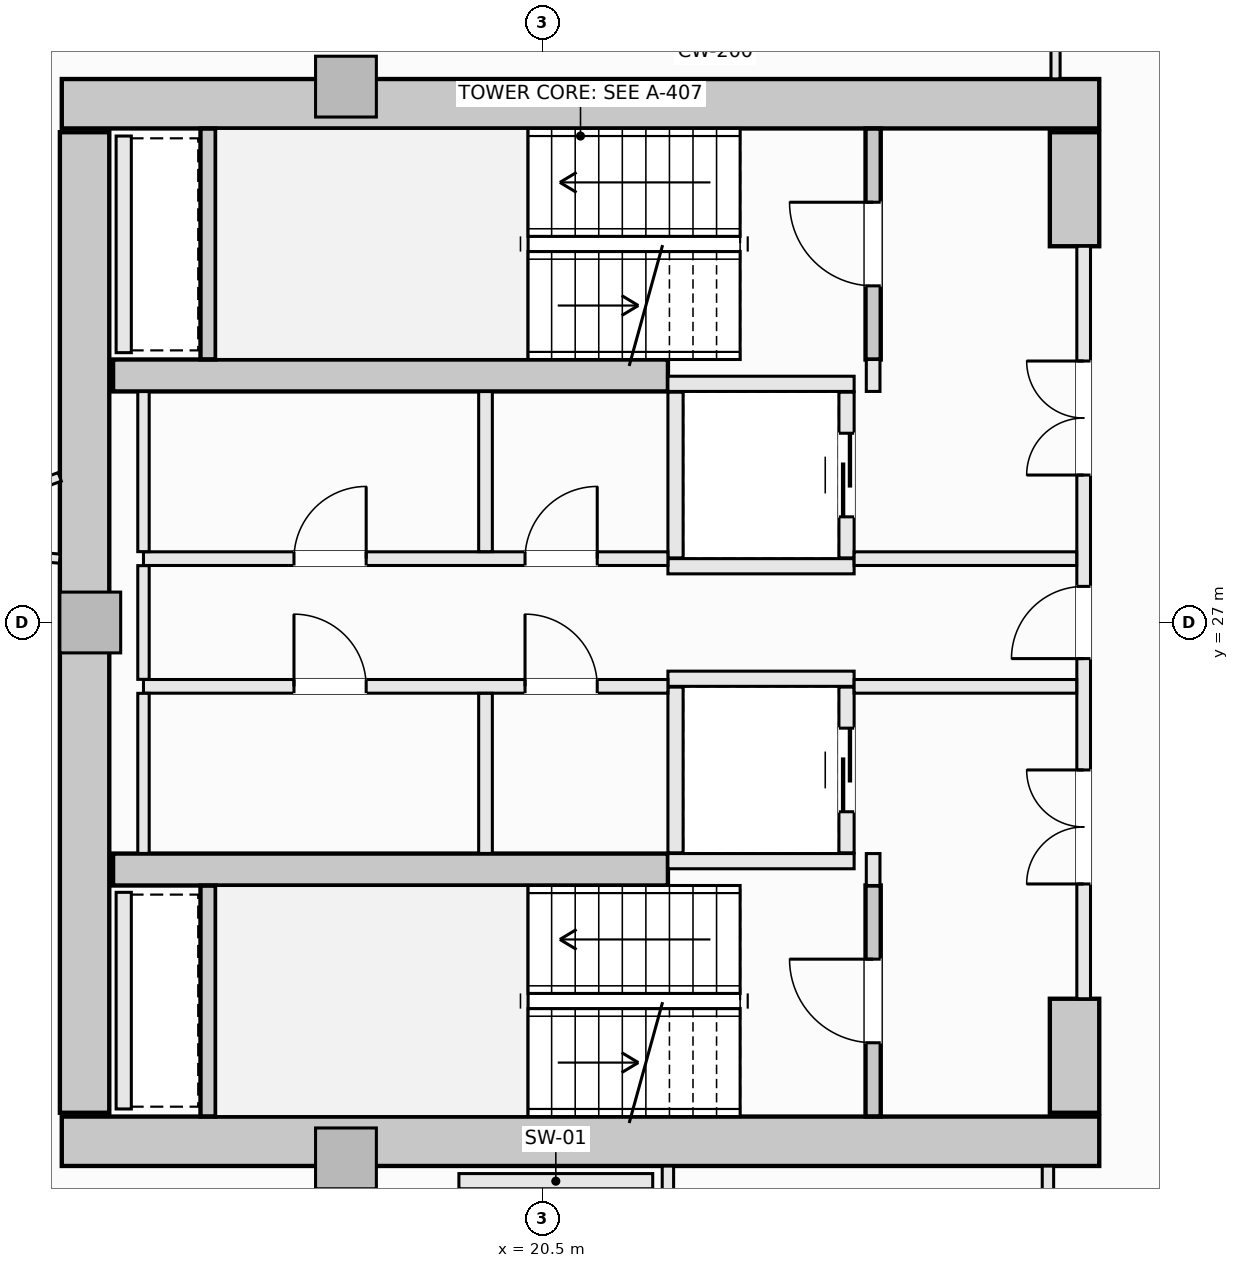
"""IFC4 building model, lengths in metres.
Left out: names, types, materials, properties, quantities, classifications, styles, units other than length and angle.
Written with IfcOpenShell. Run it as: python <this file> out.ifc"""

import sys

from ifc_helpers import new_model, si_unit, direction, frame, frame_2d, origin, origin_2d, place, context, subcontext, project, spatial, rectangle, extrude, element, fill, save


model = new_model("IFC4")
c1 = context("Model", 3, precision=1e-05, world=origin(), true_north=direction((0.0, 1.0)))
c2 = subcontext(c1, "Body", "Model", "MODEL_VIEW")
j1 = project(units=[si_unit("LENGTHUNIT", "METRE"), si_unit("PLANEANGLEUNIT", "RADIAN")], contexts=[c1])
p1 = place(None, origin())
s1 = spatial("IfcSite", under=j1, at=p1, CompositionType="ELEMENT")
p2 = place(p1, origin())
s2 = spatial("IfcBuilding", under=s1, at=p2, CompositionType="ELEMENT")
p3 = place(p2, frame((0.0, 0.0, 129.1)))
s3 = spatial("IfcBuildingStorey", under=s2, at=p3, CompositionType="ELEMENT", Elevation=129.1)
for number, where, z_axis, x_axis in (
    (1, (14.175, 33.825, -0.27), (0.0, 0.0, 1.0), (1.0, 0.0, 0.0)),
    (2, (14.175, 20.175, -0.27), (0.0, 0.0, 1.0), (1.0, 0.0, 0.0)),
):
    element("IfcWall", number, at=place(p3, frame(where, z_axis=z_axis, x_axis=x_axis)), inside=s3, PredefinedType="SHEAR", context=c2, shape_type="SweptSolid", body=[
        extrude(rectangle(XDim=13.65, YDim=0.65, at=frame_2d((6.825, 0.0))), origin(), (0.0, 0.0, 1.0), 3.4),
    ])
p4 = place(p3, frame((14.475, 20.55, -0.27), z_axis=(0.0, 0.0, 1.0), x_axis=(0.0, 1.0, 0.0)))
e3 = element("IfcWall", 3, at=p4, inside=s3, PredefinedType="SHEAR", context=c2, shape_type="SweptSolid", body=[
    extrude(rectangle(XDim=12.9, YDim=0.65, at=frame_2d((6.45, 0.0))), origin(), (0.0, 0.0, 1.0), 3.4),
])
for number, where, z_axis, x_axis in (
    (4, (27.5, 31.95, -0.27), (0.0, 0.0, 1.0), (0.0, 1.0, 0.0)),
    (5, (27.5, 20.55, -0.27), (0.0, 0.0, 1.0), (0.0, 1.0, 0.0)),
):
    element("IfcWall", number, at=place(p3, frame(where, z_axis=z_axis, x_axis=x_axis)), inside=s3, PredefinedType="SHEAR", context=c2, shape_type="SweptSolid", body=[
        extrude(rectangle(XDim=1.5, YDim=0.65, at=frame_2d((0.75, 0.0))), origin(), (0.0, 0.0, 1.0), 3.4),
    ])
for number, where, z_axis, x_axis in (
    (6, (14.85, 30.25, -0.27), (0.0, 0.0, 1.0), (1.0, 0.0, 0.0)),
    (7, (14.85, 23.75, -0.27), (0.0, 0.0, 1.0), (1.0, 0.0, 0.0)),
):
    element("IfcWall", number, at=place(p3, frame(where, z_axis=z_axis, x_axis=x_axis)), inside=s3, PredefinedType="SHEAR", context=c2, shape_type="SweptSolid", body=[
        extrude(rectangle(XDim=7.3, YDim=0.42, at=frame_2d((3.65, 0.0))), origin(), (0.0, 0.0, 1.0), 3.4),
    ])
for number, where, z_axis, x_axis in (
    (8, (17.914, 34.05, -0.27), (0.0, 0.0, 1.0), (1.0, 0.0, 0.0)),
    (9, (14.55, 27.0, -0.27), (0.0, 0.0, 1.0), (1.0, 0.0, 0.0)),
    (10, (17.914, 19.95, -0.27), (0.0, 0.0, 1.0), (1.0, 0.0, 0.0)),
):
    element("IfcColumn", number, at=place(p3, frame(where, z_axis=z_axis, x_axis=x_axis)), inside=s3, PredefinedType="PILASTER", context=c2, shape_type="SweptSolid", body=[
        extrude(rectangle(XDim=0.8, YDim=0.8, at=origin_2d()), origin(), (0.0, 0.0, 1.0), 3.4),
    ])
p5 = place(p3, frame((24.85, 30.46, -0.27), z_axis=(0.0, 0.0, 1.0), x_axis=(0.0, 1.0, 0.0)))
e11 = element("IfcWall", 11, at=p5, inside=s3, PredefinedType="SHEAR", context=c2, shape_type="SweptSolid", body=[
    extrude(rectangle(XDim=3.038, YDim=0.2, at=frame_2d((1.519, 0.0))), origin(), (0.0, 0.0, 1.0), 3.4),
])
p6 = place(p5, frame((0.969, 0.0, 0.27)))
e12 = element("IfcOpeningElement", 12, at=p6, cuts=e11, PredefinedType="OPENING", context=c2, shape_type="SweptSolid", body=[
    extrude(rectangle(XDim=1.1, YDim=2.15, at=frame_2d((0.55, 1.075))), frame((0.0, 0.11, 0.0), z_axis=(0.0, -1.0, 0.0), x_axis=(1.0, 0.0, 0.0)), (0.0, 0.0, 1.0), 0.22),
])
p7 = place(p3, frame((16.1, 30.462, -0.27), z_axis=(0.0, 0.0, 1.0), x_axis=(0.0, 1.0, 0.0)))
e13 = element("IfcWall", 13, at=p7, inside=s3, PredefinedType="SHEAR", context=c2, shape_type="SweptSolid", body=[
    extrude(rectangle(XDim=3.036, YDim=0.2, at=frame_2d((1.518, 0.0))), origin(), (0.0, 0.0, 1.0), 3.4),
])
p8 = place(p3, frame((24.85, 20.502, -0.27), z_axis=(0.0, 0.0, 1.0), x_axis=(0.0, 1.0, 0.0)))
e14 = element("IfcWall", 14, at=p8, inside=s3, PredefinedType="SHEAR", context=c2, shape_type="SweptSolid", body=[
    extrude(rectangle(XDim=3.038, YDim=0.2, at=frame_2d((1.519, 0.0))), origin(), (0.0, 0.0, 1.0), 3.4),
])
p9 = place(p8, frame((0.969, 0.0, 0.27)))
e15 = element("IfcOpeningElement", 15, at=p9, cuts=e14, PredefinedType="OPENING", context=c2, shape_type="SweptSolid", body=[
    extrude(rectangle(XDim=1.1, YDim=2.15, at=frame_2d((0.55, 1.075))), frame((0.0, 0.11, 0.0), z_axis=(0.0, -1.0, 0.0), x_axis=(1.0, 0.0, 0.0)), (0.0, 0.0, 1.0), 0.22),
])
p10 = place(p3, frame((16.1, 20.502, -0.27), z_axis=(0.0, 0.0, 1.0), x_axis=(0.0, 1.0, 0.0)))
e16 = element("IfcWall", 16, at=p10, inside=s3, PredefinedType="SHEAR", context=c2, shape_type="SweptSolid", body=[
    extrude(rectangle(XDim=3.036, YDim=0.2, at=frame_2d((1.518, 0.0))), origin(), (0.0, 0.0, 1.0), 3.4),
])
for number, where, z_axis, x_axis in (
    (17, (22.15, 30.14, 0.0), (0.0, 0.0, 1.0), (1.0, 0.0, 0.0)),
    (18, (22.15, 27.74, 0.0), (0.0, 0.0, 1.0), (1.0, 0.0, 0.0)),
):
    element("IfcWall", number, at=place(p3, frame(where, z_axis=z_axis, x_axis=x_axis)), inside=s3, PredefinedType="SOLIDWALL", context=c2, shape_type="SweptSolid", body=[
        extrude(rectangle(XDim=2.45, YDim=0.2, at=frame_2d((1.225, 0.0))), origin(), (0.0, 0.0, 1.0), 3.13),
    ])
p11 = place(p3, frame((22.25, 27.85, 0.0), z_axis=(0.0, 0.0, 1.0), x_axis=(0.0, 1.0, 0.0)))
e19 = element("IfcWall", 19, at=p11, inside=s3, PredefinedType="SOLIDWALL", context=c2, shape_type="SweptSolid", body=[
    extrude(rectangle(XDim=2.18, YDim=0.2, at=frame_2d((1.09, 0.0))), origin(), (0.0, 0.0, 1.0), 3.13),
])
p12 = place(p3, frame((24.5, 27.85, 0.0), z_axis=(0.0, 0.0, 1.0), x_axis=(0.0, 1.0, 0.0)))
e20 = element("IfcWall", 20, at=p12, inside=s3, PredefinedType="SOLIDWALL", context=c2, shape_type="SweptSolid", body=[
    extrude(rectangle(XDim=2.18, YDim=0.2, at=frame_2d((1.09, 0.0))), origin(), (0.0, 0.0, 1.0), 3.13),
])
p13 = place(p12, frame((0.54, 0.0, 0.0)))
e21 = element("IfcOpeningElement", 21, at=p13, cuts=e20, PredefinedType="OPENING", context=c2, shape_type="SweptSolid", body=[
    extrude(rectangle(XDim=1.1, YDim=2.2, at=frame_2d((0.55, 1.1))), frame((0.0, 0.11, 0.0), z_axis=(0.0, -1.0, 0.0), x_axis=(1.0, 0.0, 0.0)), (0.0, 0.0, 1.0), 0.22),
])
for number, where, z_axis, x_axis in (
    (22, (22.15, 26.26, 0.0), (0.0, 0.0, 1.0), (1.0, 0.0, 0.0)),
    (23, (22.15, 23.86, 0.0), (0.0, 0.0, 1.0), (1.0, 0.0, 0.0)),
):
    element("IfcWall", number, at=place(p3, frame(where, z_axis=z_axis, x_axis=x_axis)), inside=s3, PredefinedType="SOLIDWALL", context=c2, shape_type="SweptSolid", body=[
        extrude(rectangle(XDim=2.45, YDim=0.2, at=frame_2d((1.225, 0.0))), origin(), (0.0, 0.0, 1.0), 3.13),
    ])
p14 = place(p3, frame((22.25, 23.97, 0.0), z_axis=(0.0, 0.0, 1.0), x_axis=(0.0, 1.0, 0.0)))
e24 = element("IfcWall", 24, at=p14, inside=s3, PredefinedType="SOLIDWALL", context=c2, shape_type="SweptSolid", body=[
    extrude(rectangle(XDim=2.18, YDim=0.2, at=frame_2d((1.09, 0.0))), origin(), (0.0, 0.0, 1.0), 3.13),
])
p15 = place(p3, frame((24.5, 23.97, 0.0), z_axis=(0.0, 0.0, 1.0), x_axis=(0.0, 1.0, 0.0)))
e25 = element("IfcWall", 25, at=p15, inside=s3, PredefinedType="SOLIDWALL", context=c2, shape_type="SweptSolid", body=[
    extrude(rectangle(XDim=2.18, YDim=0.2, at=frame_2d((1.09, 0.0))), origin(), (0.0, 0.0, 1.0), 3.13),
])
p16 = place(p15, frame((0.54, 0.0, 0.0)))
e26 = element("IfcOpeningElement", 26, at=p16, cuts=e25, PredefinedType="OPENING", context=c2, shape_type="SweptSolid", body=[
    extrude(rectangle(XDim=1.1, YDim=2.2, at=frame_2d((0.55, 1.1))), frame((0.0, 0.11, 0.0), z_axis=(0.0, -1.0, 0.0), x_axis=(1.0, 0.0, 0.0)), (0.0, 0.0, 1.0), 0.22),
])
p17 = place(p3, frame((19.4, 19.65, 0.0), z_axis=(0.0, 0.0, 1.0), x_axis=(1.0, 0.0, 0.0)))
e27 = element("IfcWall", 27, at=p17, inside=s3, PredefinedType="SOLIDWALL", context=c2, shape_type="SweptSolid", body=[
    extrude(rectangle(XDim=2.55, YDim=0.2, at=frame_2d((1.275, 0.0))), origin(), (0.0, 0.0, 1.0), 3.13),
])
for number, where, z_axis, x_axis in (
    (28, (14.99, 30.55, 0.0), (0.0, 0.0, 1.0), (0.0, 1.0, 0.0)),
    (29, (14.99, 20.6, 0.0), (0.0, 0.0, 1.0), (0.0, 1.0, 0.0)),
):
    element("IfcWall", number, at=place(p3, frame(where, z_axis=z_axis, x_axis=x_axis)), inside=s3, PredefinedType="SOLIDWALL", context=c2, shape_type="SweptSolid", body=[
        extrude(rectangle(XDim=2.85, YDim=0.2, at=frame_2d((1.425, 0.0))), origin(), (0.0, 0.0, 1.0), 3.13),
    ])
for number, where, z_axis, x_axis in (
    (30, (24.85, 23.54, 0.0), (0.0, 0.0, 1.0), (0.0, 1.0, 0.0)),
    (31, (24.85, 30.04, 0.0), (0.0, 0.0, 1.0), (0.0, 1.0, 0.0)),
):
    element("IfcWall", number, at=place(p3, frame(where, z_axis=z_axis, x_axis=x_axis)), inside=s3, PredefinedType="SOLIDWALL", context=c2, shape_type="SweptSolid", body=[
        extrude(rectangle(XDim=0.42, YDim=0.18, at=frame_2d((0.21, 0.0))), origin(), (0.0, 0.0, 1.0), 3.13),
    ])
p18 = place(p3, frame((27.62, 22.05, 0.0), z_axis=(0.0, 0.0, 1.0), x_axis=(0.0, 1.0, 0.0)))
e32 = element("IfcWall", 32, at=p18, inside=s3, PredefinedType="SOLIDWALL", context=c2, shape_type="SweptSolid", body=[
    extrude(rectangle(XDim=9.9, YDim=0.18, at=frame_2d((4.95, 0.0))), origin(), (0.0, 0.0, 1.0), 3.13),
])
p19 = place(p18, frame((4.475, 0.0, 0.0)))
e33 = element("IfcOpeningElement", 33, at=p19, cuts=e32, PredefinedType="OPENING", context=c2, shape_type="SweptSolid", body=[
    extrude(rectangle(XDim=0.95, YDim=2.1, at=frame_2d((0.475, 1.05))), frame((0.0, 0.1, 0.0), z_axis=(0.0, -1.0, 0.0), x_axis=(1.0, 0.0, 0.0)), (0.0, 0.0, 1.0), 0.2),
])
p20 = place(p18, frame((6.89, 0.0, 0.0)))
e34 = element("IfcOpeningElement", 34, at=p20, cuts=e32, PredefinedType="OPENING", context=c2, shape_type="SweptSolid", body=[
    extrude(rectangle(XDim=1.5, YDim=2.2, at=frame_2d((0.75, 1.1))), frame((0.0, 0.1, 0.0), z_axis=(0.0, -1.0, 0.0), x_axis=(1.0, 0.0, 0.0)), (0.0, 0.0, 1.0), 0.2),
])
p21 = place(p18, frame((1.51, 0.0, 0.0)))
e35 = element("IfcOpeningElement", 35, at=p21, cuts=e32, PredefinedType="OPENING", context=c2, shape_type="SweptSolid", body=[
    extrude(rectangle(XDim=1.5, YDim=2.2, at=frame_2d((0.75, 1.1))), frame((0.0, 0.1, 0.0), z_axis=(0.0, -1.0, 0.0), x_axis=(1.0, 0.0, 0.0)), (0.0, 0.0, 1.0), 0.2),
])
p22 = place(p3, frame((15.25, 27.84, 0.0), z_axis=(0.0, 0.0, 1.0), x_axis=(1.0, 0.0, 0.0)))
e36 = element("IfcWall", 36, at=p22, inside=s3, PredefinedType="SOLIDWALL", context=c2, shape_type="SweptSolid", body=[
    extrude(rectangle(XDim=6.9, YDim=0.18, at=frame_2d((3.45, 0.0))), origin(), (0.0, 0.0, 1.0), 3.13),
])
p23 = place(p22, frame((5.02, 0.0, 0.0)))
e37 = element("IfcOpeningElement", 37, at=p23, cuts=e36, PredefinedType="OPENING", context=c2, shape_type="SweptSolid", body=[
    extrude(rectangle(XDim=0.95, YDim=2.1, at=frame_2d((0.475, 1.05))), frame((0.0, 0.1, 0.0), z_axis=(0.0, -1.0, 0.0), x_axis=(1.0, 0.0, 0.0)), (0.0, 0.0, 1.0), 0.2),
])
p24 = place(p22, frame((1.98, 0.0, 0.0)))
e38 = element("IfcOpeningElement", 38, at=p24, cuts=e36, PredefinedType="OPENING", context=c2, shape_type="SweptSolid", body=[
    extrude(rectangle(XDim=0.95, YDim=2.1, at=frame_2d((0.475, 1.05))), frame((0.0, 0.1, 0.0), z_axis=(0.0, -1.0, 0.0), x_axis=(1.0, 0.0, 0.0)), (0.0, 0.0, 1.0), 0.2),
])
p25 = place(p3, frame((24.6, 27.84, 0.0), z_axis=(0.0, 0.0, 1.0), x_axis=(1.0, 0.0, 0.0)))
e39 = element("IfcWall", 39, at=p25, inside=s3, PredefinedType="SOLIDWALL", context=c2, shape_type="SweptSolid", body=[
    extrude(rectangle(XDim=2.928, YDim=0.18, at=frame_2d((1.464, 0.0))), origin(), (0.0, 0.0, 1.0), 3.13),
])
p26 = place(p3, frame((15.25, 26.16, 0.0), z_axis=(0.0, 0.0, 1.0), x_axis=(1.0, 0.0, 0.0)))
e40 = element("IfcWall", 40, at=p26, inside=s3, PredefinedType="SOLIDWALL", context=c2, shape_type="SweptSolid", body=[
    extrude(rectangle(XDim=6.9, YDim=0.18, at=frame_2d((3.45, 0.0))), origin(), (0.0, 0.0, 1.0), 3.13),
])
p27 = place(p26, frame((5.02, 0.0, 0.0)))
e41 = element("IfcOpeningElement", 41, at=p27, cuts=e40, PredefinedType="OPENING", context=c2, shape_type="SweptSolid", body=[
    extrude(rectangle(XDim=0.95, YDim=2.1, at=frame_2d((0.475, 1.05))), frame((0.0, 0.1, 0.0), z_axis=(0.0, -1.0, 0.0), x_axis=(1.0, 0.0, 0.0)), (0.0, 0.0, 1.0), 0.2),
])
p28 = place(p26, frame((1.98, 0.0, 0.0)))
e42 = element("IfcOpeningElement", 42, at=p28, cuts=e40, PredefinedType="OPENING", context=c2, shape_type="SweptSolid", body=[
    extrude(rectangle(XDim=0.95, YDim=2.1, at=frame_2d((0.475, 1.05))), frame((0.0, 0.1, 0.0), z_axis=(0.0, -1.0, 0.0), x_axis=(1.0, 0.0, 0.0)), (0.0, 0.0, 1.0), 0.2),
])
p29 = place(p3, frame((24.6, 26.16, 0.0), z_axis=(0.0, 0.0, 1.0), x_axis=(1.0, 0.0, 0.0)))
e43 = element("IfcWall", 43, at=p29, inside=s3, PredefinedType="SOLIDWALL", context=c2, shape_type="SweptSolid", body=[
    extrude(rectangle(XDim=2.928, YDim=0.18, at=frame_2d((1.464, 0.0))), origin(), (0.0, 0.0, 1.0), 3.13),
])
p30 = place(p3, frame((15.25, 23.962, 0.0), z_axis=(0.0, 0.0, 1.0), x_axis=(0.0, 1.0, 0.0)))
e44 = element("IfcWall", 44, at=p30, inside=s3, PredefinedType="PARTITIONING", context=c2, shape_type="SweptSolid", body=[
    extrude(rectangle(XDim=2.106, YDim=0.15, at=frame_2d((1.053, 0.0))), origin(), (0.0, 0.0, 1.0), 3.13),
])
p31 = place(p3, frame((15.25, 26.252, 0.0), z_axis=(0.0, 0.0, 1.0), x_axis=(0.0, 1.0, 0.0)))
e45 = element("IfcWall", 45, at=p31, inside=s3, PredefinedType="PARTITIONING", context=c2, shape_type="SweptSolid", body=[
    extrude(rectangle(XDim=1.496, YDim=0.15, at=frame_2d((0.748, 0.0))), origin(), (0.0, 0.0, 1.0), 3.13),
])
p32 = place(p3, frame((15.25, 27.932, 0.0), z_axis=(0.0, 0.0, 1.0), x_axis=(0.0, 1.0, 0.0)))
e46 = element("IfcWall", 46, at=p32, inside=s3, PredefinedType="PARTITIONING", context=c2, shape_type="SweptSolid", body=[
    extrude(rectangle(XDim=2.106, YDim=0.15, at=frame_2d((1.053, 0.0))), origin(), (0.0, 0.0, 1.0), 3.13),
])
for number, where, z_axis, x_axis in (
    (47, (19.75, 23.962, 0.0), (0.0, 0.0, 1.0), (0.0, 1.0, 0.0)),
    (48, (19.75, 27.932, 0.0), (0.0, 0.0, 1.0), (0.0, 1.0, 0.0)),
):
    element("IfcWall", number, at=place(p3, frame(where, z_axis=z_axis, x_axis=x_axis)), inside=s3, PredefinedType="SOLIDWALL", context=c2, shape_type="SweptSolid", body=[
        extrude(rectangle(XDim=2.106, YDim=0.18, at=frame_2d((1.053, 0.0))), origin(), (0.0, 0.0, 1.0), 3.13),
    ])
p33 = place(p3, frame((22.15, 17.127, 0.0), z_axis=(0.0, 0.0, 1.0), x_axis=(0.0, 1.0, 0.0)))
e49 = element("IfcWall", 49, at=p33, inside=s3, PredefinedType="PARTITIONING", context=c2, shape_type="SweptSolid", body=[
    extrude(rectangle(XDim=2.721, YDim=0.15, at=frame_2d((1.36, 0.0))), origin(), (0.0, 0.0, 1.0), 3.13),
])
p34 = place(p3, frame((27.15, 17.127, 0.0), z_axis=(0.0, 0.0, 1.0), x_axis=(0.0, 1.0, 0.0)))
e50 = element("IfcWall", 50, at=p34, inside=s3, PredefinedType="PARTITIONING", context=c2, shape_type="SweptSolid", body=[
    extrude(rectangle(XDim=2.721, YDim=0.15, at=frame_2d((1.36, 0.0))), origin(), (0.0, 0.0, 1.0), 3.13),
])
p35 = place(p34, frame((0.885, 0.0, 0.0)))
e51 = element("IfcOpeningElement", 51, at=p35, cuts=e50, PredefinedType="OPENING", context=c2, shape_type="SweptSolid", body=[
    extrude(rectangle(XDim=0.95, YDim=2.1, at=frame_2d((0.475, 1.05))), frame((0.0, 0.085, 0.0), z_axis=(0.0, -1.0, 0.0), x_axis=(1.0, 0.0, 0.0)), (0.0, 0.0, 1.0), 0.17),
])
p36 = place(p3, frame((27.25, 34.152, 0.0), z_axis=(0.0, 0.0, 1.0), x_axis=(0.0, 1.0, 0.0)))
e52 = element("IfcWall", 52, at=p36, inside=s3, PredefinedType="PARTITIONING", context=c2, shape_type="SweptSolid", body=[
    extrude(rectangle(XDim=0.806, YDim=0.12, at=frame_2d((0.403, 0.0))), origin(), (0.0, 0.0, 1.0), 3.13),
])
p37 = place(p3, frame((6.343, 28.53, 0.0), z_axis=(0.0, 0.0, 1.0), x_axis=(0.996118126143, -0.088026579903, 0.0)))
e53 = element("IfcWall", 53, at=p37, inside=s3, PredefinedType="PARTITIONING", context=c2, shape_type="SweptSolid", body=[
    extrude(rectangle(XDim=7.835, YDim=0.12, at=frame_2d((3.917, 0.0))), origin(), (0.0, 0.0, 1.0), 3.13),
])
p38 = place(p3, frame((11.943, 28.097, 0.0), z_axis=(0.0, 0.0, 1.0), x_axis=(0.937403974444, 0.348243863831, 0.0)))
e54 = element("IfcWall", 54, at=p38, inside=s3, PredefinedType="PARTITIONING", context=c2, shape_type="SweptSolid", body=[
    extrude(rectangle(XDim=2.352, YDim=0.12, at=frame_2d((1.176, 0.0))), origin(), (0.0, 0.0, 1.0), 3.13),
])
p39 = place(p6, origin())
e55 = element("IfcDoor", 55, at=p39, inside=s3, OperationType="SINGLE_SWING_RIGHT", PredefinedType="DOOR", context=c2, shape_type="SweptSolid", body=[
    extrude(rectangle(XDim=1.1, YDim=2.15, at=frame_2d((0.55, 1.075))), frame((0.0, 0.025, 0.0), z_axis=(0.0, -1.0, 0.0), x_axis=(1.0, 0.0, 0.0)), (0.0, 0.0, 1.0), 0.05),
])
fill(e12, e55)
p40 = place(p9, origin())
e56 = element("IfcDoor", 56, at=p40, inside=s3, OperationType="SINGLE_SWING_RIGHT", PredefinedType="DOOR", context=c2, shape_type="SweptSolid", body=[
    extrude(rectangle(XDim=1.1, YDim=2.15, at=frame_2d((0.55, 1.075))), frame((0.0, 0.025, 0.0), z_axis=(0.0, -1.0, 0.0), x_axis=(1.0, 0.0, 0.0)), (0.0, 0.0, 1.0), 0.05),
])
fill(e15, e56)
p41 = place(p13, origin())
e57 = element("IfcDoor", 57, at=p41, inside=s3, OperationType="SLIDING_TO_LEFT", PredefinedType="DOOR", context=c2, shape_type="SweptSolid", body=[
    extrude(rectangle(XDim=1.1, YDim=2.2, at=frame_2d((0.55, 1.1))), frame((0.0, 0.025, 0.0), z_axis=(0.0, -1.0, 0.0), x_axis=(1.0, 0.0, 0.0)), (0.0, 0.0, 1.0), 0.05),
])
fill(e21, e57)
p42 = place(p16, origin())
e58 = element("IfcDoor", 58, at=p42, inside=s3, OperationType="SLIDING_TO_LEFT", PredefinedType="DOOR", context=c2, shape_type="SweptSolid", body=[
    extrude(rectangle(XDim=1.1, YDim=2.2, at=frame_2d((0.55, 1.1))), frame((0.0, 0.025, 0.0), z_axis=(0.0, -1.0, 0.0), x_axis=(1.0, 0.0, 0.0)), (0.0, 0.0, 1.0), 0.05),
])
fill(e26, e58)
p43 = place(p19, origin())
e59 = element("IfcDoor", 59, at=p43, inside=s3, OperationType="SINGLE_SWING_LEFT", PredefinedType="DOOR", context=c2, shape_type="SweptSolid", body=[
    extrude(rectangle(XDim=0.95, YDim=2.1, at=frame_2d((0.475, 1.05))), frame((0.0, 0.025, 0.0), z_axis=(0.0, -1.0, 0.0), x_axis=(1.0, 0.0, 0.0)), (0.0, 0.0, 1.0), 0.05),
])
fill(e33, e59)
p44 = place(p20, origin())
e60 = element("IfcDoor", 60, at=p44, inside=s3, OperationType="DOUBLE_DOOR_SINGLE_SWING", PredefinedType="DOOR", context=c2, shape_type="SweptSolid", body=[
    extrude(rectangle(XDim=1.5, YDim=2.2, at=frame_2d((0.75, 1.1))), frame((0.0, 0.025, 0.0), z_axis=(0.0, -1.0, 0.0), x_axis=(1.0, 0.0, 0.0)), (0.0, 0.0, 1.0), 0.05),
])
fill(e34, e60)
p45 = place(p21, origin())
e61 = element("IfcDoor", 61, at=p45, inside=s3, OperationType="DOUBLE_DOOR_SINGLE_SWING", PredefinedType="DOOR", context=c2, shape_type="SweptSolid", body=[
    extrude(rectangle(XDim=1.5, YDim=2.2, at=frame_2d((0.75, 1.1))), frame((0.0, 0.025, 0.0), z_axis=(0.0, -1.0, 0.0), x_axis=(1.0, 0.0, 0.0)), (0.0, 0.0, 1.0), 0.05),
])
fill(e35, e61)
p46 = place(p23, origin())
e62 = element("IfcDoor", 62, at=p46, inside=s3, OperationType="SINGLE_SWING_RIGHT", PredefinedType="DOOR", context=c2, shape_type="SweptSolid", body=[
    extrude(rectangle(XDim=0.95, YDim=2.1, at=frame_2d((0.475, 1.05))), frame((0.0, 0.025, 0.0), z_axis=(0.0, -1.0, 0.0), x_axis=(1.0, 0.0, 0.0)), (0.0, 0.0, 1.0), 0.05),
])
fill(e37, e62)
p47 = place(p27, origin())
e63 = element("IfcDoor", 63, at=p47, inside=s3, OperationType="SINGLE_SWING_LEFT", PredefinedType="DOOR", context=c2, shape_type="SweptSolid", body=[
    extrude(rectangle(XDim=0.95, YDim=2.1, at=frame_2d((0.475, 1.05))), frame((0.0, 0.025, 0.0), z_axis=(0.0, -1.0, 0.0), x_axis=(1.0, 0.0, 0.0)), (0.0, 0.0, 1.0), 0.05),
])
fill(e41, e63)
p48 = place(p24, origin())
e64 = element("IfcDoor", 64, at=p48, inside=s3, OperationType="SINGLE_SWING_RIGHT", PredefinedType="DOOR", context=c2, shape_type="SweptSolid", body=[
    extrude(rectangle(XDim=0.95, YDim=2.1, at=frame_2d((0.475, 1.05))), frame((0.0, 0.025, 0.0), z_axis=(0.0, -1.0, 0.0), x_axis=(1.0, 0.0, 0.0)), (0.0, 0.0, 1.0), 0.05),
])
fill(e38, e64)
p49 = place(p28, origin())
e65 = element("IfcDoor", 65, at=p49, inside=s3, OperationType="SINGLE_SWING_LEFT", PredefinedType="DOOR", context=c2, shape_type="SweptSolid", body=[
    extrude(rectangle(XDim=0.95, YDim=2.1, at=frame_2d((0.475, 1.05))), frame((0.0, 0.025, 0.0), z_axis=(0.0, -1.0, 0.0), x_axis=(1.0, 0.0, 0.0)), (0.0, 0.0, 1.0), 0.05),
])
fill(e42, e65)
save(model, sys.argv[1])
